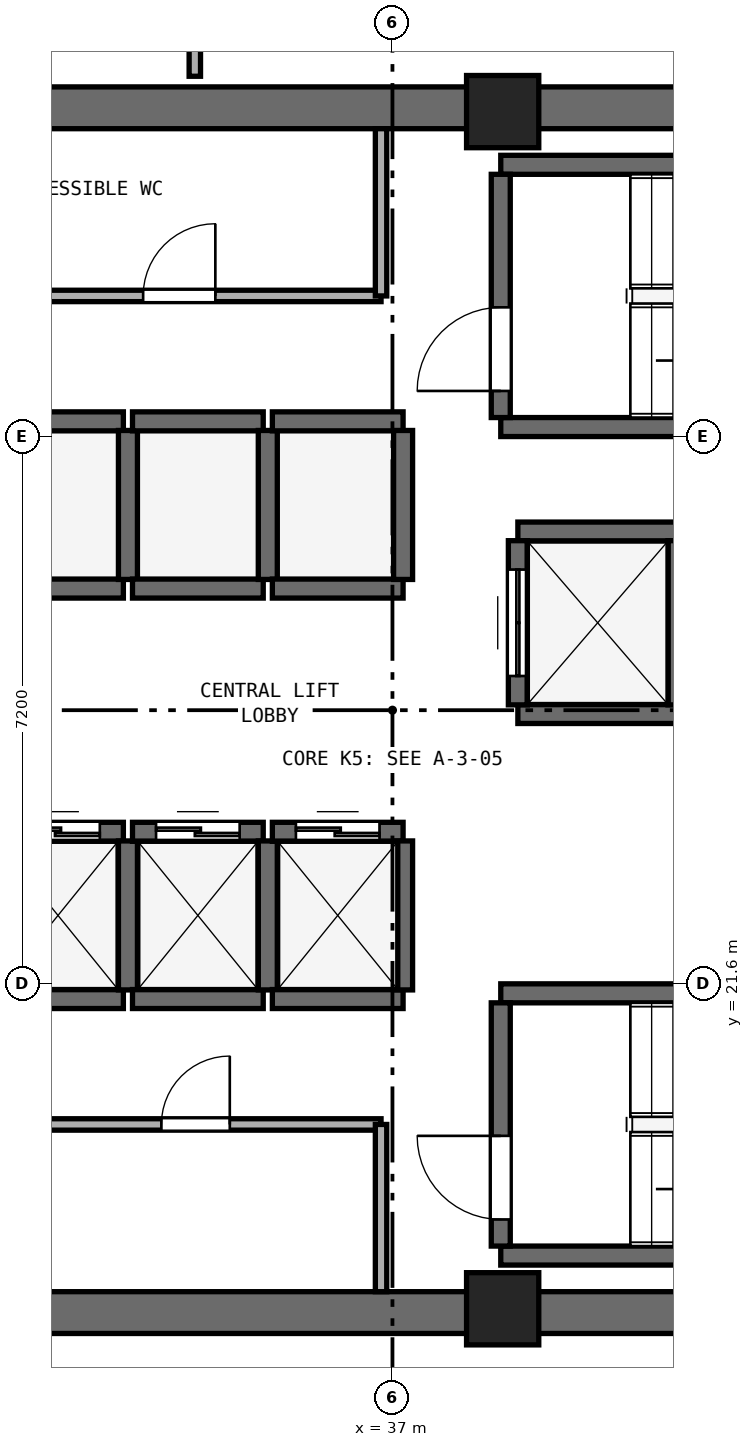
"""IFC4 building model, lengths in metres.
Left out: names, types, materials, properties, quantities, classifications, styles, units other than length and angle.
Written with IfcOpenShell. Run it as: python <this file> out.ifc"""

import sys

from ifc_helpers import new_model, si_unit, direction, frame, frame_2d, origin, origin_2d, place, context, subcontext, project, spatial, rectangle, extrude, element, fill, save


model = new_model("IFC4")
c1 = context("Model", 3, precision=1e-05, world=origin(), true_north=direction((0.0, 1.0)))
c2 = subcontext(c1, "Body", "Model", "MODEL_VIEW")
j1 = project(units=[si_unit("LENGTHUNIT", "METRE"), si_unit("PLANEANGLEUNIT", "RADIAN")], contexts=[c1])
p1 = place(None, origin())
s1 = spatial("IfcSite", under=j1, at=p1, CompositionType="ELEMENT")
p2 = place(p1, origin())
s2 = spatial("IfcBuilding", under=s1, at=p2, CompositionType="ELEMENT")
p3 = place(p2, frame((0.0, 0.0, 182.0)))
s3 = spatial("IfcBuildingStorey", under=s2, at=p3, CompositionType="ELEMENT", Elevation=182.0)
for number, where, z_axis, x_axis in (
    (1, (25.4, 17.275, 0.0), (0.0, 0.0, 1.0), (1.0, 0.0, 0.0)),
    (2, (25.4, 33.125, 0.0), (0.0, 0.0, 1.0), (1.0, 0.0, 0.0)),
):
    element("IfcWall", number, at=place(p3, frame(where, z_axis=z_axis, x_axis=x_axis)), inside=s3, PredefinedType="SHEAR", context=c2, shape_type="SweptSolid", body=[
        extrude(rectangle(XDim=23.2, YDim=0.55, at=frame_2d((11.6, 0.0))), origin(), (0.0, 0.0, 1.0), 3.54),
    ])
for number, where, z_axis, x_axis in (
    (3, (38.45, 17.325, 0.0), (0.0, 0.0, 1.0), (1.0, 0.0, 0.0)),
    (4, (38.45, 33.075, 0.0), (0.0, 0.0, 1.0), (1.0, 0.0, 0.0)),
):
    element("IfcColumn", number, at=place(p3, frame(where, z_axis=z_axis, x_axis=x_axis)), inside=s3, PredefinedType="PILASTER", context=c2, shape_type="SweptSolid", body=[
        extrude(rectangle(XDim=0.95, YDim=0.95, at=origin_2d()), origin(), (0.0, 0.0, 1.0), 3.8),
    ])
for number, where, z_axis, x_axis in (
    (5, (38.425, 28.925, 0.0), (0.0, 0.0, 1.0), (1.0, 0.0, 0.0)),
    (6, (38.425, 32.375, 0.0), (0.0, 0.0, 1.0), (1.0, 0.0, 0.0)),
):
    element("IfcWall", number, at=place(p3, frame(where, z_axis=z_axis, x_axis=x_axis)), inside=s3, PredefinedType="SHEAR", context=c2, shape_type="SweptSolid", body=[
        extrude(rectangle(XDim=7.3, YDim=0.25, at=frame_2d((3.65, 0.0))), origin(), (0.0, 0.0, 1.0), 3.54),
    ])
p4 = place(p3, frame((38.425, 29.05, 0.0), z_axis=(0.0, 0.0, 1.0), x_axis=(0.0, 1.0, 0.0)))
e7 = element("IfcWall", 7, at=p4, inside=s3, PredefinedType="SHEAR", context=c2, shape_type="SweptSolid", body=[
    extrude(rectangle(XDim=3.2, YDim=0.25, at=frame_2d((1.6, 0.0))), origin(), (0.0, 0.0, 1.0), 3.54),
])
p5 = place(p4, frame((0.35, 0.0, 0.0)))
e8 = element("IfcOpeningElement", 8, at=p5, cuts=e7, PredefinedType="OPENING", context=c2, shape_type="SweptSolid", body=[
    extrude(rectangle(XDim=1.1, YDim=2.15, at=frame_2d((0.55, 1.075))), frame((0.0, 0.135, 0.0), z_axis=(0.0, -1.0, 0.0), x_axis=(1.0, 0.0, 0.0)), (0.0, 0.0, 1.0), 0.27),
])
for number, where, z_axis, x_axis in (
    (9, (38.425, 18.025, 0.0), (0.0, 0.0, 1.0), (1.0, 0.0, 0.0)),
    (10, (38.425, 21.475, 0.0), (0.0, 0.0, 1.0), (1.0, 0.0, 0.0)),
):
    element("IfcWall", number, at=place(p3, frame(where, z_axis=z_axis, x_axis=x_axis)), inside=s3, PredefinedType="SHEAR", context=c2, shape_type="SweptSolid", body=[
        extrude(rectangle(XDim=7.3, YDim=0.25, at=frame_2d((3.65, 0.0))), origin(), (0.0, 0.0, 1.0), 3.54),
    ])
p6 = place(p3, frame((38.425, 18.15, 0.0), z_axis=(0.0, 0.0, 1.0), x_axis=(0.0, 1.0, 0.0)))
e11 = element("IfcWall", 11, at=p6, inside=s3, PredefinedType="SHEAR", context=c2, shape_type="SweptSolid", body=[
    extrude(rectangle(XDim=3.2, YDim=0.25, at=frame_2d((1.6, 0.0))), origin(), (0.0, 0.0, 1.0), 3.54),
])
p7 = place(p6, frame((0.35, 0.0, 0.0)))
e12 = element("IfcOpeningElement", 12, at=p7, cuts=e11, PredefinedType="OPENING", context=c2, shape_type="SweptSolid", body=[
    extrude(rectangle(XDim=1.1, YDim=2.15, at=frame_2d((0.55, 1.075))), frame((0.0, 0.135, 0.0), z_axis=(0.0, -1.0, 0.0), x_axis=(1.0, 0.0, 0.0)), (0.0, 0.0, 1.0), 0.27),
])
p8 = place(p3, frame((31.74, 21.4, 0.0), z_axis=(0.0, 0.0, 1.0), x_axis=(1.0, 0.0, 0.0)))
e13 = element("IfcWall", 13, at=p8, inside=s3, PredefinedType="SHEAR", context=c2, shape_type="SweptSolid", body=[
    extrude(rectangle(XDim=1.72, YDim=0.25, at=frame_2d((0.86, 0.0))), origin(), (0.0, 0.0, 1.0), 3.54),
])
p9 = place(p3, frame((31.74, 23.6, 0.0), z_axis=(0.0, 0.0, 1.0), x_axis=(1.0, 0.0, 0.0)))
e14 = element("IfcWall", 14, at=p9, inside=s3, PredefinedType="SHEAR", context=c2, shape_type="SweptSolid", body=[
    extrude(rectangle(XDim=1.72, YDim=0.25, at=frame_2d((0.86, 0.0))), origin(), (0.0, 0.0, 1.0), 3.54),
])
p10 = place(p9, frame((0.31, 0.0, 0.0)))
e15 = element("IfcOpeningElement", 15, at=p10, cuts=e14, PredefinedType="OPENING", context=c2, shape_type="SweptSolid", body=[
    extrude(rectangle(XDim=1.1, YDim=2.15, at=frame_2d((0.55, 1.075))), frame((0.0, 0.135, 0.0), z_axis=(0.0, -1.0, 0.0), x_axis=(1.0, 0.0, 0.0)), (0.0, 0.0, 1.0), 0.27),
])
p11 = place(p3, frame((33.52, 21.52, 0.0), z_axis=(0.0, 0.0, 1.0), x_axis=(0.0, 1.0, 0.0)))
e16 = element("IfcWall", 16, at=p11, inside=s3, PredefinedType="SHEAR", context=c2, shape_type="SweptSolid", body=[
    extrude(rectangle(XDim=1.96, YDim=0.25, at=frame_2d((0.98, 0.0))), origin(), (0.0, 0.0, 1.0), 3.54),
])
p12 = place(p3, frame((33.58, 21.4, 0.0), z_axis=(0.0, 0.0, 1.0), x_axis=(1.0, 0.0, 0.0)))
e17 = element("IfcWall", 17, at=p12, inside=s3, PredefinedType="SHEAR", context=c2, shape_type="SweptSolid", body=[
    extrude(rectangle(XDim=1.72, YDim=0.25, at=frame_2d((0.86, 0.0))), origin(), (0.0, 0.0, 1.0), 3.54),
])
p13 = place(p3, frame((33.58, 23.6, 0.0), z_axis=(0.0, 0.0, 1.0), x_axis=(1.0, 0.0, 0.0)))
e18 = element("IfcWall", 18, at=p13, inside=s3, PredefinedType="SHEAR", context=c2, shape_type="SweptSolid", body=[
    extrude(rectangle(XDim=1.72, YDim=0.25, at=frame_2d((0.86, 0.0))), origin(), (0.0, 0.0, 1.0), 3.54),
])
p14 = place(p13, frame((0.31, 0.0, 0.0)))
e19 = element("IfcOpeningElement", 19, at=p14, cuts=e18, PredefinedType="OPENING", context=c2, shape_type="SweptSolid", body=[
    extrude(rectangle(XDim=1.1, YDim=2.15, at=frame_2d((0.55, 1.075))), frame((0.0, 0.135, 0.0), z_axis=(0.0, -1.0, 0.0), x_axis=(1.0, 0.0, 0.0)), (0.0, 0.0, 1.0), 0.27),
])
p15 = place(p3, frame((35.36, 21.52, 0.0), z_axis=(0.0, 0.0, 1.0), x_axis=(0.0, 1.0, 0.0)))
e20 = element("IfcWall", 20, at=p15, inside=s3, PredefinedType="SHEAR", context=c2, shape_type="SweptSolid", body=[
    extrude(rectangle(XDim=1.96, YDim=0.25, at=frame_2d((0.98, 0.0))), origin(), (0.0, 0.0, 1.0), 3.54),
])
p16 = place(p3, frame((35.42, 21.4, 0.0), z_axis=(0.0, 0.0, 1.0), x_axis=(1.0, 0.0, 0.0)))
e21 = element("IfcWall", 21, at=p16, inside=s3, PredefinedType="SHEAR", context=c2, shape_type="SweptSolid", body=[
    extrude(rectangle(XDim=1.72, YDim=0.25, at=frame_2d((0.86, 0.0))), origin(), (0.0, 0.0, 1.0), 3.54),
])
p17 = place(p3, frame((35.42, 23.6, 0.0), z_axis=(0.0, 0.0, 1.0), x_axis=(1.0, 0.0, 0.0)))
e22 = element("IfcWall", 22, at=p17, inside=s3, PredefinedType="SHEAR", context=c2, shape_type="SweptSolid", body=[
    extrude(rectangle(XDim=1.72, YDim=0.25, at=frame_2d((0.86, 0.0))), origin(), (0.0, 0.0, 1.0), 3.54),
])
p18 = place(p17, frame((0.31, 0.0, 0.0)))
e23 = element("IfcOpeningElement", 23, at=p18, cuts=e22, PredefinedType="OPENING", context=c2, shape_type="SweptSolid", body=[
    extrude(rectangle(XDim=1.1, YDim=2.15, at=frame_2d((0.55, 1.075))), frame((0.0, 0.135, 0.0), z_axis=(0.0, -1.0, 0.0), x_axis=(1.0, 0.0, 0.0)), (0.0, 0.0, 1.0), 0.27),
])
p19 = place(p3, frame((37.14, 21.52, 0.0), z_axis=(0.0, 0.0, 1.0), x_axis=(0.0, 1.0, 0.0)))
e24 = element("IfcWall", 24, at=p19, inside=s3, PredefinedType="SHEAR", context=c2, shape_type="SweptSolid", body=[
    extrude(rectangle(XDim=1.96, YDim=0.25, at=frame_2d((0.98, 0.0))), origin(), (0.0, 0.0, 1.0), 3.54),
])
for number, where, z_axis, x_axis in (
    (25, (31.74, 26.8, 0.0), (0.0, 0.0, 1.0), (1.0, 0.0, 0.0)),
    (26, (31.74, 29.0, 0.0), (0.0, 0.0, 1.0), (1.0, 0.0, 0.0)),
):
    element("IfcWall", number, at=place(p3, frame(where, z_axis=z_axis, x_axis=x_axis)), inside=s3, PredefinedType="SHEAR", context=c2, shape_type="SweptSolid", body=[
        extrude(rectangle(XDim=1.72, YDim=0.25, at=frame_2d((0.86, 0.0))), origin(), (0.0, 0.0, 1.0), 3.54),
    ])
p20 = place(p3, frame((33.52, 26.92, 0.0), z_axis=(0.0, 0.0, 1.0), x_axis=(0.0, 1.0, 0.0)))
e27 = element("IfcWall", 27, at=p20, inside=s3, PredefinedType="SHEAR", context=c2, shape_type="SweptSolid", body=[
    extrude(rectangle(XDim=1.96, YDim=0.25, at=frame_2d((0.98, 0.0))), origin(), (0.0, 0.0, 1.0), 3.54),
])
for number, where, z_axis, x_axis in (
    (28, (33.58, 26.8, 0.0), (0.0, 0.0, 1.0), (1.0, 0.0, 0.0)),
    (29, (33.58, 29.0, 0.0), (0.0, 0.0, 1.0), (1.0, 0.0, 0.0)),
):
    element("IfcWall", number, at=place(p3, frame(where, z_axis=z_axis, x_axis=x_axis)), inside=s3, PredefinedType="SHEAR", context=c2, shape_type="SweptSolid", body=[
        extrude(rectangle(XDim=1.72, YDim=0.25, at=frame_2d((0.86, 0.0))), origin(), (0.0, 0.0, 1.0), 3.54),
    ])
p21 = place(p3, frame((35.36, 26.92, 0.0), z_axis=(0.0, 0.0, 1.0), x_axis=(0.0, 1.0, 0.0)))
e30 = element("IfcWall", 30, at=p21, inside=s3, PredefinedType="SHEAR", context=c2, shape_type="SweptSolid", body=[
    extrude(rectangle(XDim=1.96, YDim=0.25, at=frame_2d((0.98, 0.0))), origin(), (0.0, 0.0, 1.0), 3.54),
])
for number, where, z_axis, x_axis in (
    (31, (35.42, 26.8, 0.0), (0.0, 0.0, 1.0), (1.0, 0.0, 0.0)),
    (32, (35.42, 29.0, 0.0), (0.0, 0.0, 1.0), (1.0, 0.0, 0.0)),
):
    element("IfcWall", number, at=place(p3, frame(where, z_axis=z_axis, x_axis=x_axis)), inside=s3, PredefinedType="SHEAR", context=c2, shape_type="SweptSolid", body=[
        extrude(rectangle(XDim=1.72, YDim=0.25, at=frame_2d((0.86, 0.0))), origin(), (0.0, 0.0, 1.0), 3.54),
    ])
p22 = place(p3, frame((37.14, 26.92, 0.0), z_axis=(0.0, 0.0, 1.0), x_axis=(0.0, 1.0, 0.0)))
e33 = element("IfcWall", 33, at=p22, inside=s3, PredefinedType="SHEAR", context=c2, shape_type="SweptSolid", body=[
    extrude(rectangle(XDim=1.96, YDim=0.25, at=frame_2d((0.98, 0.0))), origin(), (0.0, 0.0, 1.0), 3.54),
])
for number, where, z_axis, x_axis in (
    (34, (38.65, 25.15, 0.0), (0.0, 0.0, 1.0), (1.0, 0.0, 0.0)),
    (35, (38.65, 27.55, 0.0), (0.0, 0.0, 1.0), (1.0, 0.0, 0.0)),
):
    element("IfcWall", number, at=place(p3, frame(where, z_axis=z_axis, x_axis=x_axis)), inside=s3, PredefinedType="SHEAR", context=c2, shape_type="SweptSolid", body=[
        extrude(rectangle(XDim=2.1, YDim=0.25, at=frame_2d((1.05, 0.0))), origin(), (0.0, 0.0, 1.0), 3.54),
    ])
p23 = place(p3, frame((38.65, 25.27, 0.0), z_axis=(0.0, 0.0, 1.0), x_axis=(0.0, 1.0, 0.0)))
e36 = element("IfcWall", 36, at=p23, inside=s3, PredefinedType="SHEAR", context=c2, shape_type="SweptSolid", body=[
    extrude(rectangle(XDim=2.16, YDim=0.25, at=frame_2d((1.08, 0.0))), origin(), (0.0, 0.0, 1.0), 3.54),
])
p24 = place(p23, frame((0.38, 0.0, 0.0)))
e37 = element("IfcOpeningElement", 37, at=p24, cuts=e36, PredefinedType="OPENING", context=c2, shape_type="SweptSolid", body=[
    extrude(rectangle(XDim=1.4, YDim=2.2, at=frame_2d((0.7, 1.1))), frame((0.0, 0.135, 0.0), z_axis=(0.0, -1.0, 0.0), x_axis=(1.0, 0.0, 0.0)), (0.0, 0.0, 1.0), 0.27),
])
p25 = place(p3, frame((40.75, 25.27, 0.0), z_axis=(0.0, 0.0, 1.0), x_axis=(0.0, 1.0, 0.0)))
e38 = element("IfcWall", 38, at=p25, inside=s3, PredefinedType="SHEAR", context=c2, shape_type="SweptSolid", body=[
    extrude(rectangle(XDim=2.16, YDim=0.25, at=frame_2d((1.08, 0.0))), origin(), (0.0, 0.0, 1.0), 3.54),
])
p26 = place(p3, frame((31.54, 30.65, 0.0), z_axis=(0.0, 0.0, 1.0), x_axis=(1.0, 0.0, 0.0)))
e39 = element("IfcWall", 39, at=p26, inside=s3, PredefinedType="PARTITIONING", context=c2, shape_type="SweptSolid", body=[
    extrude(rectangle(XDim=5.31, YDim=0.15, at=frame_2d((2.655, 0.0))), origin(), (0.0, 0.0, 1.0), 3.54),
])
p27 = place(p26, frame((2.18, 0.0, 0.0)))
e40 = element("IfcOpeningElement", 40, at=p27, cuts=e39, PredefinedType="OPENING", context=c2, shape_type="SweptSolid", body=[
    extrude(rectangle(XDim=0.95, YDim=2.1, at=frame_2d((0.475, 1.05))), frame((0.0, 0.085, 0.0), z_axis=(0.0, -1.0, 0.0), x_axis=(1.0, 0.0, 0.0)), (0.0, 0.0, 1.0), 0.17),
])
p28 = place(p3, frame((36.85, 30.65, 0.0), z_axis=(0.0, 0.0, 1.0), x_axis=(0.0, 1.0, 0.0)))
e41 = element("IfcWall", 41, at=p28, inside=s3, PredefinedType="PARTITIONING", context=c2, shape_type="SweptSolid", body=[
    extrude(rectangle(XDim=2.2, YDim=0.15, at=frame_2d((1.1, 0.0))), origin(), (0.0, 0.0, 1.0), 3.54),
])
p29 = place(p3, frame((31.97, 19.75, 0.0), z_axis=(0.0, 0.0, 1.0), x_axis=(1.0, 0.0, 0.0)))
e42 = element("IfcWall", 42, at=p29, inside=s3, PredefinedType="PARTITIONING", context=c2, shape_type="SweptSolid", body=[
    extrude(rectangle(XDim=4.88, YDim=0.15, at=frame_2d((2.44, 0.0))), origin(), (0.0, 0.0, 1.0), 3.54),
])
p30 = place(p29, frame((1.99, 0.0, 0.0)))
e43 = element("IfcOpeningElement", 43, at=p30, cuts=e42, PredefinedType="OPENING", context=c2, shape_type="SweptSolid", body=[
    extrude(rectangle(XDim=0.9, YDim=2.1, at=frame_2d((0.45, 1.05))), frame((0.0, 0.085, 0.0), z_axis=(0.0, -1.0, 0.0), x_axis=(1.0, 0.0, 0.0)), (0.0, 0.0, 1.0), 0.17),
])
p31 = place(p3, frame((36.85, 17.55, 0.0), z_axis=(0.0, 0.0, 1.0), x_axis=(0.0, 1.0, 0.0)))
e44 = element("IfcWall", 44, at=p31, inside=s3, PredefinedType="PARTITIONING", context=c2, shape_type="SweptSolid", body=[
    extrude(rectangle(XDim=2.2, YDim=0.15, at=frame_2d((1.1, 0.0))), origin(), (0.0, 0.0, 1.0), 3.54),
])
p32 = place(p3, frame((34.4, 33.54, 0.0), z_axis=(0.0, 0.0, 1.0), x_axis=(0.0, 1.0, 0.0)))
e45 = element("IfcWall", 45, at=p32, inside=s3, PredefinedType="PARTITIONING", context=c2, shape_type="SweptSolid", body=[
    extrude(rectangle(XDim=3.71, YDim=0.15, at=frame_2d((1.855, 0.0))), origin(), (0.0, 0.0, 1.0), 3.54),
])
p33 = place(p32, frame((1.355, 0.0, 0.0)))
e46 = element("IfcOpeningElement", 46, at=p33, cuts=e45, PredefinedType="OPENING", context=c2, shape_type="SweptSolid", body=[
    extrude(rectangle(XDim=1.0, YDim=2.12, at=frame_2d((0.5, 1.06))), frame((0.0, 0.085, 0.0), z_axis=(0.0, -1.0, 0.0), x_axis=(1.0, 0.0, 0.0)), (0.0, 0.0, 1.0), 0.17),
])
p34 = place(p5, origin())
e47 = element("IfcDoor", 47, at=p34, inside=s3, OperationType="SINGLE_SWING_LEFT", PredefinedType="DOOR", context=c2, shape_type="SweptSolid", body=[
    extrude(rectangle(XDim=1.1, YDim=2.15, at=frame_2d((0.55, 1.075))), frame((0.0, 0.025, 0.0), z_axis=(0.0, -1.0, 0.0), x_axis=(1.0, 0.0, 0.0)), (0.0, 0.0, 1.0), 0.05),
])
fill(e8, e47)
p35 = place(p7, origin())
e48 = element("IfcDoor", 48, at=p35, inside=s3, OperationType="SINGLE_SWING_RIGHT", PredefinedType="DOOR", context=c2, shape_type="SweptSolid", body=[
    extrude(rectangle(XDim=1.1, YDim=2.15, at=frame_2d((0.55, 1.075))), frame((0.0, 0.025, 0.0), z_axis=(0.0, -1.0, 0.0), x_axis=(1.0, 0.0, 0.0)), (0.0, 0.0, 1.0), 0.05),
])
fill(e12, e48)
p36 = place(p10, origin())
e49 = element("IfcDoor", 49, at=p36, inside=s3, OperationType="DOUBLE_DOOR_SLIDING", PredefinedType="DOOR", context=c2, shape_type="SweptSolid", body=[
    extrude(rectangle(XDim=1.1, YDim=2.15, at=frame_2d((0.55, 1.075))), frame((0.0, 0.025, 0.0), z_axis=(0.0, -1.0, 0.0), x_axis=(1.0, 0.0, 0.0)), (0.0, 0.0, 1.0), 0.05),
])
fill(e15, e49)
p37 = place(p14, origin())
e50 = element("IfcDoor", 50, at=p37, inside=s3, OperationType="DOUBLE_DOOR_SLIDING", PredefinedType="DOOR", context=c2, shape_type="SweptSolid", body=[
    extrude(rectangle(XDim=1.1, YDim=2.15, at=frame_2d((0.55, 1.075))), frame((0.0, 0.025, 0.0), z_axis=(0.0, -1.0, 0.0), x_axis=(1.0, 0.0, 0.0)), (0.0, 0.0, 1.0), 0.05),
])
fill(e19, e50)
p38 = place(p18, origin())
e51 = element("IfcDoor", 51, at=p38, inside=s3, OperationType="DOUBLE_DOOR_SLIDING", PredefinedType="DOOR", context=c2, shape_type="SweptSolid", body=[
    extrude(rectangle(XDim=1.1, YDim=2.15, at=frame_2d((0.55, 1.075))), frame((0.0, 0.025, 0.0), z_axis=(0.0, -1.0, 0.0), x_axis=(1.0, 0.0, 0.0)), (0.0, 0.0, 1.0), 0.05),
])
fill(e23, e51)
p39 = place(p24, origin())
e52 = element("IfcDoor", 52, at=p39, inside=s3, OperationType="DOUBLE_DOOR_SLIDING", PredefinedType="DOOR", context=c2, shape_type="SweptSolid", body=[
    extrude(rectangle(XDim=1.4, YDim=2.2, at=frame_2d((0.7, 1.1))), frame((0.0, 0.025, 0.0), z_axis=(0.0, -1.0, 0.0), x_axis=(1.0, 0.0, 0.0)), (0.0, 0.0, 1.0), 0.05),
])
fill(e37, e52)
p40 = place(p27, origin())
e53 = element("IfcDoor", 53, at=p40, inside=s3, OperationType="SINGLE_SWING_RIGHT", PredefinedType="DOOR", context=c2, shape_type="SweptSolid", body=[
    extrude(rectangle(XDim=0.95, YDim=2.1, at=frame_2d((0.475, 1.05))), frame((0.0, 0.025, 0.0), z_axis=(0.0, -1.0, 0.0), x_axis=(1.0, 0.0, 0.0)), (0.0, 0.0, 1.0), 0.05),
])
fill(e40, e53)
p41 = place(p30, origin())
e54 = element("IfcDoor", 54, at=p41, inside=s3, OperationType="SINGLE_SWING_RIGHT", PredefinedType="DOOR", context=c2, shape_type="SweptSolid", body=[
    extrude(rectangle(XDim=0.9, YDim=2.1, at=frame_2d((0.45, 1.05))), frame((0.0, 0.025, 0.0), z_axis=(0.0, -1.0, 0.0), x_axis=(1.0, 0.0, 0.0)), (0.0, 0.0, 1.0), 0.05),
])
fill(e43, e54)
save(model, sys.argv[1])
